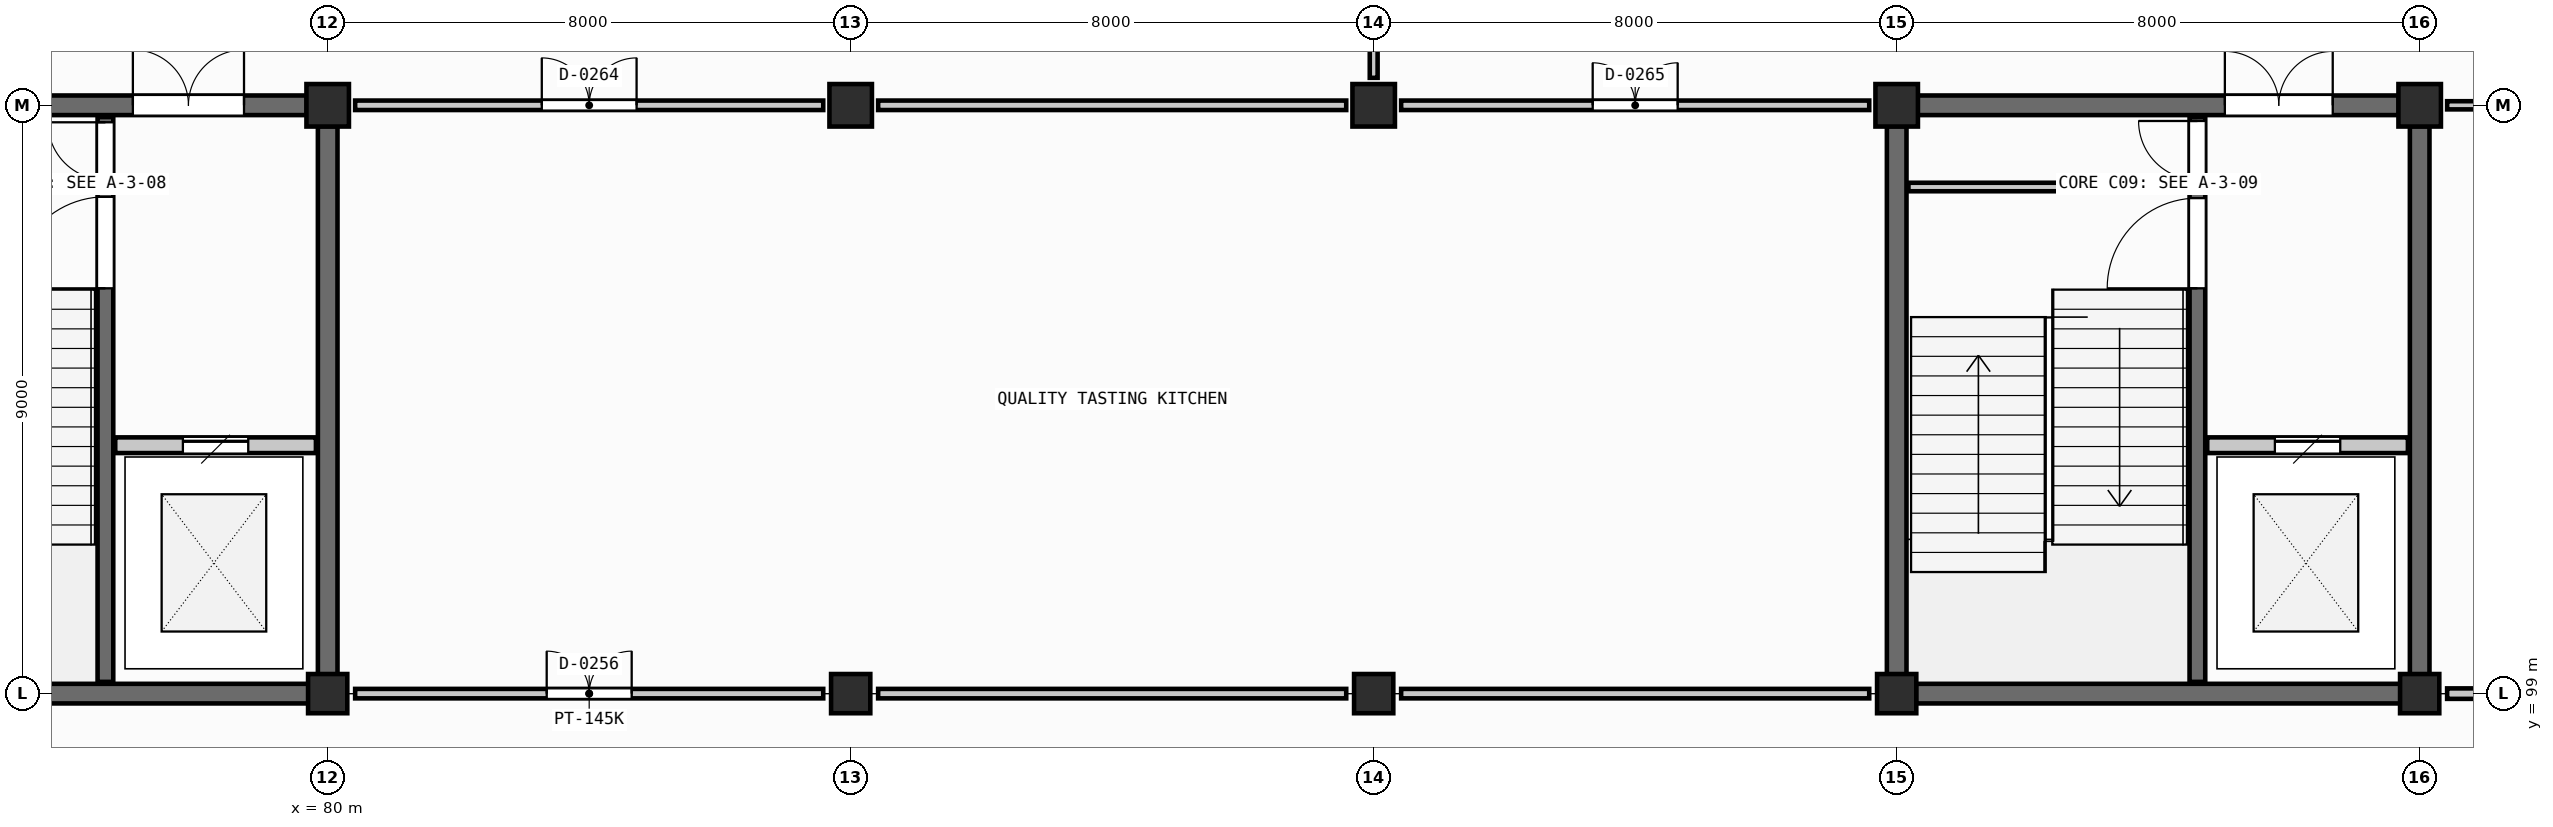
"""IFC4 building model, lengths in metres.
Left out: names, types, materials, properties, quantities, classifications, styles, units other than length and angle.
Written with IfcOpenShell. Run it as: python <this file> out.ifc"""

import sys

from ifc_helpers import new_model, si_unit, direction, frame, frame_2d, origin, origin_2d, place, context, subcontext, project, spatial, rectangle, extrude, element, fill, save


model = new_model("IFC4")
c1 = context("Model", 3, precision=1e-05, world=origin(), true_north=direction((0.0, 1.0)))
c2 = subcontext(c1, "Body", "Model", "MODEL_VIEW")
j1 = project(units=[si_unit("LENGTHUNIT", "METRE"), si_unit("PLANEANGLEUNIT", "RADIAN")], contexts=[c1])
p1 = place(None, origin())
s1 = spatial("IfcSite", under=j1, at=p1, CompositionType="ELEMENT")
p2 = place(p1, origin())
s2 = spatial("IfcBuilding", under=s1, at=p2, CompositionType="ELEMENT")
p3 = place(p2, frame((0.0, 0.0, 4.8)))
s3 = spatial("IfcBuildingStorey", under=s2, at=p3, CompositionType="ELEMENT", Elevation=4.8)
p4 = place(p3, frame((80.0, 99.0, 0.0), z_axis=(0.0, 0.0, 1.0), x_axis=(1.0, 0.0, 0.0)))
e1 = element("IfcColumn", 1, at=p4, inside=s3, PredefinedType="COLUMN", context=c2, shape_type="SweptSolid", body=[
    extrude(rectangle(XDim=0.6, YDim=0.6, at=origin_2d()), origin(), (0.0, 0.0, 1.0), 4.2),
])
p5 = place(p3, frame((80.0, 108.0, 0.0), z_axis=(0.0, 0.0, 1.0), x_axis=(1.0, 0.0, 0.0)))
e2 = element("IfcColumn", 2, at=p5, inside=s3, PredefinedType="COLUMN", context=c2, shape_type="SweptSolid", body=[
    extrude(rectangle(XDim=0.65, YDim=0.65, at=origin_2d()), origin(), (0.0, 0.0, 1.0), 4.2),
])
p6 = place(p3, frame((88.0, 99.0, 0.0), z_axis=(0.0, 0.0, 1.0), x_axis=(1.0, 0.0, 0.0)))
e3 = element("IfcColumn", 3, at=p6, inside=s3, PredefinedType="COLUMN", context=c2, shape_type="SweptSolid", body=[
    extrude(rectangle(XDim=0.6, YDim=0.6, at=origin_2d()), origin(), (0.0, 0.0, 1.0), 4.2),
])
p7 = place(p3, frame((88.0, 108.0, 0.0), z_axis=(0.0, 0.0, 1.0), x_axis=(1.0, 0.0, 0.0)))
e4 = element("IfcColumn", 4, at=p7, inside=s3, PredefinedType="COLUMN", context=c2, shape_type="SweptSolid", body=[
    extrude(rectangle(XDim=0.65, YDim=0.65, at=origin_2d()), origin(), (0.0, 0.0, 1.0), 4.2),
])
p8 = place(p3, frame((96.0, 99.0, 0.0), z_axis=(0.0, 0.0, 1.0), x_axis=(1.0, 0.0, 0.0)))
e5 = element("IfcColumn", 5, at=p8, inside=s3, PredefinedType="COLUMN", context=c2, shape_type="SweptSolid", body=[
    extrude(rectangle(XDim=0.6, YDim=0.6, at=origin_2d()), origin(), (0.0, 0.0, 1.0), 4.2),
])
p9 = place(p3, frame((96.0, 108.0, 0.0), z_axis=(0.0, 0.0, 1.0), x_axis=(1.0, 0.0, 0.0)))
e6 = element("IfcColumn", 6, at=p9, inside=s3, PredefinedType="COLUMN", context=c2, shape_type="SweptSolid", body=[
    extrude(rectangle(XDim=0.65, YDim=0.65, at=origin_2d()), origin(), (0.0, 0.0, 1.0), 4.2),
])
p10 = place(p3, frame((104.0, 99.0, 0.0), z_axis=(0.0, 0.0, 1.0), x_axis=(1.0, 0.0, 0.0)))
e7 = element("IfcColumn", 7, at=p10, inside=s3, PredefinedType="COLUMN", context=c2, shape_type="SweptSolid", body=[
    extrude(rectangle(XDim=0.6, YDim=0.6, at=origin_2d()), origin(), (0.0, 0.0, 1.0), 4.2),
])
p11 = place(p3, frame((104.0, 108.0, 0.0), z_axis=(0.0, 0.0, 1.0), x_axis=(1.0, 0.0, 0.0)))
e8 = element("IfcColumn", 8, at=p11, inside=s3, PredefinedType="COLUMN", context=c2, shape_type="SweptSolid", body=[
    extrude(rectangle(XDim=0.65, YDim=0.65, at=origin_2d()), origin(), (0.0, 0.0, 1.0), 4.2),
])
p12 = place(p3, frame((112.0, 99.0, 0.0), z_axis=(0.0, 0.0, 1.0), x_axis=(1.0, 0.0, 0.0)))
e9 = element("IfcColumn", 9, at=p12, inside=s3, PredefinedType="COLUMN", context=c2, shape_type="SweptSolid", body=[
    extrude(rectangle(XDim=0.6, YDim=0.6, at=origin_2d()), origin(), (0.0, 0.0, 1.0), 4.2),
])
p13 = place(p3, frame((112.0, 108.0, 0.0), z_axis=(0.0, 0.0, 1.0), x_axis=(1.0, 0.0, 0.0)))
e10 = element("IfcColumn", 10, at=p13, inside=s3, PredefinedType="COLUMN", context=c2, shape_type="SweptSolid", body=[
    extrude(rectangle(XDim=0.65, YDim=0.65, at=origin_2d()), origin(), (0.0, 0.0, 1.0), 4.2),
])
p14 = place(p3, frame((72.295, 99.0, 0.0), z_axis=(0.0, 0.0, 1.0), x_axis=(1.0, 0.0, 0.0)))
e11 = element("IfcWall", 11, at=p14, inside=s3, PredefinedType="SHEAR", context=c2, shape_type="SweptSolid", body=[
    extrude(rectangle(XDim=7.41, YDim=0.3, at=frame_2d((3.705, 0.0))), origin(), (0.0, 0.0, 1.0), 3.955),
])
p15 = place(p3, frame((72.32, 108.0, 0.0), z_axis=(0.0, 0.0, 1.0), x_axis=(1.0, 0.0, 0.0)))
e12 = element("IfcWall", 12, at=p15, inside=s3, PredefinedType="SHEAR", context=c2, shape_type="SweptSolid", body=[
    extrude(rectangle(XDim=7.36, YDim=0.3, at=frame_2d((3.68, 0.0))), origin(), (0.0, 0.0, 1.0), 3.955),
])
p16 = place(p15, frame((4.7, 0.0, 0.0)))
e13 = element("IfcOpeningElement", 13, at=p16, cuts=e12, PredefinedType="OPENING", context=c2, shape_type="SweptSolid", body=[
    extrude(rectangle(XDim=1.7, YDim=2.25, at=frame_2d((0.85, 1.125))), frame((0.0, 0.16, 0.0), z_axis=(0.0, -1.0, 0.0), x_axis=(1.0, 0.0, 0.0)), (0.0, 0.0, 1.0), 0.32),
])
p17 = place(p3, frame((80.0, 99.295, 0.0), z_axis=(0.0, 0.0, 1.0), x_axis=(0.0, 1.0, 0.0)))
e14 = element("IfcWall", 14, at=p17, inside=s3, PredefinedType="SHEAR", context=c2, shape_type="SweptSolid", body=[
    extrude(rectangle(XDim=8.385, YDim=0.3, at=frame_2d((4.192, 0.0))), origin(), (0.0, 0.0, 1.0), 3.955),
])
p18 = place(p3, frame((76.6, 99.18, 0.0), z_axis=(0.0, 0.0, 1.0), x_axis=(0.0, 1.0, 0.0)))
e15 = element("IfcWall", 15, at=p18, inside=s3, PredefinedType="SHEAR", context=c2, shape_type="SweptSolid", body=[
    extrude(rectangle(XDim=8.64, YDim=0.24, at=frame_2d((4.32, 0.0))), origin(), (0.0, 0.0, 1.0), 3.955),
])
p19 = place(p18, frame((6.02, 0.0, 0.0)))
e16 = element("IfcOpeningElement", 16, at=p19, cuts=e15, PredefinedType="OPENING", context=c2, shape_type="SweptSolid", body=[
    extrude(rectangle(XDim=1.4, YDim=2.2, at=frame_2d((0.7, 1.1))), frame((0.0, 0.13, 0.0), z_axis=(0.0, -1.0, 0.0), x_axis=(1.0, 0.0, 0.0)), (0.0, 0.0, 1.0), 0.26),
])
p20 = place(p18, frame((7.68, 0.0, 0.0)))
e17 = element("IfcOpeningElement", 17, at=p20, cuts=e15, PredefinedType="OPENING", context=c2, shape_type="SweptSolid", body=[
    extrude(rectangle(XDim=0.88, YDim=2.02, at=frame_2d((0.44, 1.01))), frame((0.0, 0.13, 0.0), z_axis=(0.0, -1.0, 0.0), x_axis=(1.0, 0.0, 0.0)), (0.0, 0.0, 1.0), 0.26),
])
p21 = place(p3, frame((72.18, 106.75, 0.0), z_axis=(0.0, 0.0, 1.0), x_axis=(1.0, 0.0, 0.0)))
e18 = element("IfcWall", 18, at=p21, inside=s3, PredefinedType="PARTITIONING", context=c2, shape_type="SweptSolid", body=[
    extrude(rectangle(XDim=4.28, YDim=0.13, at=frame_2d((2.14, 0.0))), origin(), (0.0, 0.0, 1.0), 3.305),
])
p22 = place(p3, frame((76.75, 102.8, 0.0), z_axis=(0.0, 0.0, 1.0), x_axis=(1.0, 0.0, 0.0)))
e19 = element("IfcWall", 19, at=p22, inside=s3, PredefinedType="SHEAR", context=c2, shape_type="SweptSolid", body=[
    extrude(rectangle(XDim=3.07, YDim=0.24, at=frame_2d((1.535, 0.0))), origin(), (0.0, 0.0, 1.0), 3.305),
])
p23 = place(p22, frame((1.035, 0.0, 0.0)))
e20 = element("IfcOpeningElement", 20, at=p23, cuts=e19, PredefinedType="OPENING", context=c2, shape_type="SweptSolid", body=[
    extrude(rectangle(XDim=1.0, YDim=2.15, at=frame_2d((0.5, 1.075))), frame((0.0, 0.13, 0.0), z_axis=(0.0, -1.0, 0.0), x_axis=(1.0, 0.0, 0.0)), (0.0, 0.0, 1.0), 0.26),
])
p24 = place(p3, frame((104.295, 99.0, 0.0), z_axis=(0.0, 0.0, 1.0), x_axis=(1.0, 0.0, 0.0)))
e21 = element("IfcWall", 21, at=p24, inside=s3, PredefinedType="SHEAR", context=c2, shape_type="SweptSolid", body=[
    extrude(rectangle(XDim=7.41, YDim=0.3, at=frame_2d((3.705, 0.0))), origin(), (0.0, 0.0, 1.0), 3.955),
])
p25 = place(p3, frame((104.32, 108.0, 0.0), z_axis=(0.0, 0.0, 1.0), x_axis=(1.0, 0.0, 0.0)))
e22 = element("IfcWall", 22, at=p25, inside=s3, PredefinedType="SHEAR", context=c2, shape_type="SweptSolid", body=[
    extrude(rectangle(XDim=7.36, YDim=0.3, at=frame_2d((3.68, 0.0))), origin(), (0.0, 0.0, 1.0), 3.955),
])
p26 = place(p25, frame((4.7, 0.0, 0.0)))
e23 = element("IfcOpeningElement", 23, at=p26, cuts=e22, PredefinedType="OPENING", context=c2, shape_type="SweptSolid", body=[
    extrude(rectangle(XDim=1.65, YDim=2.22, at=frame_2d((0.825, 1.11))), frame((0.0, 0.16, 0.0), z_axis=(0.0, -1.0, 0.0), x_axis=(1.0, 0.0, 0.0)), (0.0, 0.0, 1.0), 0.32),
])
for number, where, z_axis, x_axis in (
    (24, (104.0, 99.295, 0.0), (0.0, 0.0, 1.0), (0.0, 1.0, 0.0)),
    (25, (112.0, 99.295, 0.0), (0.0, 0.0, 1.0), (0.0, 1.0, 0.0)),
):
    element("IfcWall", number, at=place(p3, frame(where, z_axis=z_axis, x_axis=x_axis)), inside=s3, PredefinedType="SHEAR", context=c2, shape_type="SweptSolid", body=[
        extrude(rectangle(XDim=8.385, YDim=0.3, at=frame_2d((4.192, 0.0))), origin(), (0.0, 0.0, 1.0), 3.955),
    ])
p27 = place(p3, frame((108.6, 99.18, 0.0), z_axis=(0.0, 0.0, 1.0), x_axis=(0.0, 1.0, 0.0)))
e26 = element("IfcWall", 26, at=p27, inside=s3, PredefinedType="SHEAR", context=c2, shape_type="SweptSolid", body=[
    extrude(rectangle(XDim=8.64, YDim=0.24, at=frame_2d((4.32, 0.0))), origin(), (0.0, 0.0, 1.0), 3.955),
])
p28 = place(p27, frame((6.02, 0.0, 0.0)))
e27 = element("IfcOpeningElement", 27, at=p28, cuts=e26, PredefinedType="OPENING", context=c2, shape_type="SweptSolid", body=[
    extrude(rectangle(XDim=1.38, YDim=2.22, at=frame_2d((0.69, 1.11))), frame((0.0, 0.13, 0.0), z_axis=(0.0, -1.0, 0.0), x_axis=(1.0, 0.0, 0.0)), (0.0, 0.0, 1.0), 0.26),
])
p29 = place(p27, frame((7.68, 0.0, 0.0)))
e28 = element("IfcOpeningElement", 28, at=p29, cuts=e26, PredefinedType="OPENING", context=c2, shape_type="SweptSolid", body=[
    extrude(rectangle(XDim=0.9, YDim=2.05, at=frame_2d((0.45, 1.025))), frame((0.0, 0.13, 0.0), z_axis=(0.0, -1.0, 0.0), x_axis=(1.0, 0.0, 0.0)), (0.0, 0.0, 1.0), 0.26),
])
p30 = place(p3, frame((104.18, 106.75, 0.0), z_axis=(0.0, 0.0, 1.0), x_axis=(1.0, 0.0, 0.0)))
e29 = element("IfcWall", 29, at=p30, inside=s3, PredefinedType="PARTITIONING", context=c2, shape_type="SweptSolid", body=[
    extrude(rectangle(XDim=4.28, YDim=0.13, at=frame_2d((2.14, 0.0))), origin(), (0.0, 0.0, 1.0), 3.305),
])
p31 = place(p3, frame((108.75, 102.8, 0.0), z_axis=(0.0, 0.0, 1.0), x_axis=(1.0, 0.0, 0.0)))
e30 = element("IfcWall", 30, at=p31, inside=s3, PredefinedType="SHEAR", context=c2, shape_type="SweptSolid", body=[
    extrude(rectangle(XDim=3.07, YDim=0.24, at=frame_2d((1.535, 0.0))), origin(), (0.0, 0.0, 1.0), 3.305),
])
p32 = place(p31, frame((1.035, 0.0, 0.0)))
e31 = element("IfcOpeningElement", 31, at=p32, cuts=e30, PredefinedType="OPENING", context=c2, shape_type="SweptSolid", body=[
    extrude(rectangle(XDim=1.0, YDim=2.15, at=frame_2d((0.5, 1.075))), frame((0.0, 0.13, 0.0), z_axis=(0.0, -1.0, 0.0), x_axis=(1.0, 0.0, 0.0)), (0.0, 0.0, 1.0), 0.26),
])
p33 = place(p3, frame((80.42, 99.0, 0.0), z_axis=(0.0, 0.0, 1.0), x_axis=(1.0, 0.0, 0.0)))
e32 = element("IfcWall", 32, at=p33, inside=s3, PredefinedType="PARTITIONING", context=c2, shape_type="SweptSolid", body=[
    extrude(rectangle(XDim=7.16, YDim=0.145, at=frame_2d((3.58, 0.0))), origin(), (0.0, 0.0, 1.0), 3.05),
])
p34 = place(p33, frame((2.93, 0.0, 0.0)))
e33 = element("IfcOpeningElement", 33, at=p34, cuts=e32, PredefinedType="OPENING", context=c2, shape_type="SweptSolid", body=[
    extrude(rectangle(XDim=1.3, YDim=2.15, at=frame_2d((0.65, 1.075))), frame((0.0, 0.083, 0.0), z_axis=(0.0, -1.0, 0.0), x_axis=(1.0, 0.0, 0.0)), (0.0, 0.0, 1.0), 0.165),
])
for number, where, z_axis, x_axis in (
    (34, (88.42, 99.0, 0.0), (0.0, 0.0, 1.0), (1.0, 0.0, 0.0)),
    (35, (96.42, 99.0, 0.0), (0.0, 0.0, 1.0), (1.0, 0.0, 0.0)),
):
    element("IfcWall", number, at=place(p3, frame(where, z_axis=z_axis, x_axis=x_axis)), inside=s3, PredefinedType="PARTITIONING", context=c2, shape_type="SweptSolid", body=[
        extrude(rectangle(XDim=7.16, YDim=0.145, at=frame_2d((3.58, 0.0))), origin(), (0.0, 0.0, 1.0), 3.05),
    ])
p35 = place(p3, frame((112.42, 99.0, 0.0), z_axis=(0.0, 0.0, 1.0), x_axis=(1.0, 0.0, 0.0)))
e36 = element("IfcWall", 36, at=p35, inside=s3, PredefinedType="PARTITIONING", context=c2, shape_type="SweptSolid", body=[
    extrude(rectangle(XDim=7.16, YDim=0.16, at=frame_2d((3.58, 0.0))), origin(), (0.0, 0.0, 1.0), 3.05),
])
p36 = place(p35, frame((3.06, 0.0, 0.0)))
e37 = element("IfcOpeningElement", 37, at=p36, cuts=e36, PredefinedType="OPENING", context=c2, shape_type="SweptSolid", body=[
    extrude(rectangle(XDim=1.04, YDim=2.13, at=frame_2d((0.52, 1.065))), frame((0.0, 0.09, 0.0), z_axis=(0.0, -1.0, 0.0), x_axis=(1.0, 0.0, 0.0)), (0.0, 0.0, 1.0), 0.18),
])
p37 = place(p3, frame((80.42, 108.0, 0.0), z_axis=(0.0, 0.0, 1.0), x_axis=(1.0, 0.0, 0.0)))
e38 = element("IfcWall", 38, at=p37, inside=s3, PredefinedType="PARTITIONING", context=c2, shape_type="SweptSolid", body=[
    extrude(rectangle(XDim=7.16, YDim=0.145, at=frame_2d((3.58, 0.0))), origin(), (0.0, 0.0, 1.0), 3.05),
])
p38 = place(p37, frame((2.855, 0.0, 0.0)))
e39 = element("IfcOpeningElement", 39, at=p38, cuts=e38, PredefinedType="OPENING", context=c2, shape_type="SweptSolid", body=[
    extrude(rectangle(XDim=1.45, YDim=2.2, at=frame_2d((0.725, 1.1))), frame((0.0, 0.083, 0.0), z_axis=(0.0, -1.0, 0.0), x_axis=(1.0, 0.0, 0.0)), (0.0, 0.0, 1.0), 0.165),
])
p39 = place(p3, frame((88.42, 108.0, 0.0), z_axis=(0.0, 0.0, 1.0), x_axis=(1.0, 0.0, 0.0)))
e40 = element("IfcWall", 40, at=p39, inside=s3, PredefinedType="PARTITIONING", context=c2, shape_type="SweptSolid", body=[
    extrude(rectangle(XDim=7.16, YDim=0.145, at=frame_2d((3.58, 0.0))), origin(), (0.0, 0.0, 1.0), 3.05),
])
p40 = place(p3, frame((96.42, 108.0, 0.0), z_axis=(0.0, 0.0, 1.0), x_axis=(1.0, 0.0, 0.0)))
e41 = element("IfcWall", 41, at=p40, inside=s3, PredefinedType="PARTITIONING", context=c2, shape_type="SweptSolid", body=[
    extrude(rectangle(XDim=7.16, YDim=0.145, at=frame_2d((3.58, 0.0))), origin(), (0.0, 0.0, 1.0), 3.05),
])
p41 = place(p40, frame((2.93, 0.0, 0.0)))
e42 = element("IfcOpeningElement", 42, at=p41, cuts=e41, PredefinedType="OPENING", context=c2, shape_type="SweptSolid", body=[
    extrude(rectangle(XDim=1.3, YDim=2.15, at=frame_2d((0.65, 1.075))), frame((0.0, 0.083, 0.0), z_axis=(0.0, -1.0, 0.0), x_axis=(1.0, 0.0, 0.0)), (0.0, 0.0, 1.0), 0.165),
])
p42 = place(p3, frame((112.42, 108.0, 0.0), z_axis=(0.0, 0.0, 1.0), x_axis=(1.0, 0.0, 0.0)))
e43 = element("IfcWall", 43, at=p42, inside=s3, PredefinedType="PARTITIONING", context=c2, shape_type="SweptSolid", body=[
    extrude(rectangle(XDim=7.16, YDim=0.125, at=frame_2d((3.58, 0.0))), origin(), (0.0, 0.0, 1.0), 3.05),
])
p43 = place(p42, frame((3.09, 0.0, 0.0)))
e44 = element("IfcOpeningElement", 44, at=p43, cuts=e43, PredefinedType="OPENING", context=c2, shape_type="SweptSolid", body=[
    extrude(rectangle(XDim=0.98, YDim=2.12, at=frame_2d((0.49, 1.06))), frame((0.0, 0.073, 0.0), z_axis=(0.0, -1.0, 0.0), x_axis=(1.0, 0.0, 0.0)), (0.0, 0.0, 1.0), 0.145),
])
p44 = place(p3, frame((96.0, 108.42, 0.0), z_axis=(0.0, 0.0, 1.0), x_axis=(0.0, 1.0, 0.0)))
e45 = element("IfcWall", 45, at=p44, inside=s3, PredefinedType="PARTITIONING", context=c2, shape_type="SweptSolid", body=[
    extrude(rectangle(XDim=8.16, YDim=0.12, at=frame_2d((4.08, 0.0))), origin(), (0.0, 0.0, 1.0), 3.05),
])
p45 = place(p44, frame((3.54, 0.0, 0.0)))
e46 = element("IfcOpeningElement", 46, at=p45, cuts=e45, PredefinedType="OPENING", context=c2, shape_type="SweptSolid", body=[
    extrude(rectangle(XDim=1.08, YDim=2.16, at=frame_2d((0.54, 1.08))), frame((0.0, 0.07, 0.0), z_axis=(0.0, -1.0, 0.0), x_axis=(1.0, 0.0, 0.0)), (0.0, 0.0, 1.0), 0.14),
])
p46 = place(p19, origin())
e47 = element("IfcDoor", 47, at=p46, inside=s3, OperationType="SINGLE_SWING_LEFT", PredefinedType="DOOR", context=c2, shape_type="SweptSolid", body=[
    extrude(rectangle(XDim=1.4, YDim=2.2, at=frame_2d((0.7, 1.1))), frame((0.0, 0.025, 0.0), z_axis=(0.0, -1.0, 0.0), x_axis=(1.0, 0.0, 0.0)), (0.0, 0.0, 1.0), 0.05),
])
fill(e16, e47)
p47 = place(p20, origin())
e48 = element("IfcDoor", 48, at=p47, inside=s3, OperationType="SINGLE_SWING_RIGHT", PredefinedType="DOOR", context=c2, shape_type="SweptSolid", body=[
    extrude(rectangle(XDim=0.88, YDim=2.02, at=frame_2d((0.44, 1.01))), frame((0.0, 0.025, 0.0), z_axis=(0.0, -1.0, 0.0), x_axis=(1.0, 0.0, 0.0)), (0.0, 0.0, 1.0), 0.05),
])
fill(e17, e48)
p48 = place(p16, origin())
e49 = element("IfcDoor", 49, at=p48, inside=s3, OperationType="DOUBLE_DOOR_SINGLE_SWING", PredefinedType="DOOR", context=c2, shape_type="SweptSolid", body=[
    extrude(rectangle(XDim=1.7, YDim=2.25, at=frame_2d((0.85, 1.125))), frame((0.0, 0.025, 0.0), z_axis=(0.0, -1.0, 0.0), x_axis=(1.0, 0.0, 0.0)), (0.0, 0.0, 1.0), 0.05),
])
fill(e13, e49)
p49 = place(p23, origin())
e50 = element("IfcDoor", 50, at=p49, inside=s3, OperationType="SLIDING_TO_LEFT", PredefinedType="DOOR", context=c2, shape_type="SweptSolid", body=[
    extrude(rectangle(XDim=1.0, YDim=2.15, at=frame_2d((0.5, 1.075))), frame((0.0, 0.025, 0.0), z_axis=(0.0, -1.0, 0.0), x_axis=(1.0, 0.0, 0.0)), (0.0, 0.0, 1.0), 0.05),
])
fill(e20, e50)
p50 = place(p28, origin())
e51 = element("IfcDoor", 51, at=p50, inside=s3, OperationType="SINGLE_SWING_LEFT", PredefinedType="DOOR", context=c2, shape_type="SweptSolid", body=[
    extrude(rectangle(XDim=1.38, YDim=2.22, at=frame_2d((0.69, 1.11))), frame((0.0, 0.025, 0.0), z_axis=(0.0, -1.0, 0.0), x_axis=(1.0, 0.0, 0.0)), (0.0, 0.0, 1.0), 0.05),
])
fill(e27, e51)
p51 = place(p29, origin())
e52 = element("IfcDoor", 52, at=p51, inside=s3, OperationType="SINGLE_SWING_RIGHT", PredefinedType="DOOR", context=c2, shape_type="SweptSolid", body=[
    extrude(rectangle(XDim=0.9, YDim=2.05, at=frame_2d((0.45, 1.025))), frame((0.0, 0.025, 0.0), z_axis=(0.0, -1.0, 0.0), x_axis=(1.0, 0.0, 0.0)), (0.0, 0.0, 1.0), 0.05),
])
fill(e28, e52)
p52 = place(p26, origin())
e53 = element("IfcDoor", 53, at=p52, inside=s3, OperationType="DOUBLE_DOOR_SINGLE_SWING", PredefinedType="DOOR", context=c2, shape_type="SweptSolid", body=[
    extrude(rectangle(XDim=1.65, YDim=2.22, at=frame_2d((0.825, 1.11))), frame((0.0, 0.025, 0.0), z_axis=(0.0, -1.0, 0.0), x_axis=(1.0, 0.0, 0.0)), (0.0, 0.0, 1.0), 0.05),
])
fill(e23, e53)
p53 = place(p32, origin())
e54 = element("IfcDoor", 54, at=p53, inside=s3, OperationType="SLIDING_TO_LEFT", PredefinedType="DOOR", context=c2, shape_type="SweptSolid", body=[
    extrude(rectangle(XDim=1.0, YDim=2.15, at=frame_2d((0.5, 1.075))), frame((0.0, 0.025, 0.0), z_axis=(0.0, -1.0, 0.0), x_axis=(1.0, 0.0, 0.0)), (0.0, 0.0, 1.0), 0.05),
])
fill(e31, e54)
p54 = place(p34, origin())
e55 = element("IfcDoor", 55, at=p54, inside=s3, OperationType="DOUBLE_DOOR_DOUBLE_SWING", PredefinedType="DOOR", context=c2, shape_type="SweptSolid", body=[
    extrude(rectangle(XDim=1.3, YDim=2.15, at=frame_2d((0.65, 1.075))), frame((0.0, 0.025, 0.0), z_axis=(0.0, -1.0, 0.0), x_axis=(1.0, 0.0, 0.0)), (0.0, 0.0, 1.0), 0.05),
])
fill(e33, e55)
p55 = place(p38, origin())
e56 = element("IfcDoor", 56, at=p55, inside=s3, OperationType="DOUBLE_DOOR_DOUBLE_SWING", PredefinedType="DOOR", context=c2, shape_type="SweptSolid", body=[
    extrude(rectangle(XDim=1.45, YDim=2.2, at=frame_2d((0.725, 1.1))), frame((0.0, 0.025, 0.0), z_axis=(0.0, -1.0, 0.0), x_axis=(1.0, 0.0, 0.0)), (0.0, 0.0, 1.0), 0.05),
])
fill(e39, e56)
p56 = place(p41, origin())
e57 = element("IfcDoor", 57, at=p56, inside=s3, OperationType="DOUBLE_DOOR_DOUBLE_SWING", PredefinedType="DOOR", context=c2, shape_type="SweptSolid", body=[
    extrude(rectangle(XDim=1.3, YDim=2.15, at=frame_2d((0.65, 1.075))), frame((0.0, 0.025, 0.0), z_axis=(0.0, -1.0, 0.0), x_axis=(1.0, 0.0, 0.0)), (0.0, 0.0, 1.0), 0.05),
])
fill(e42, e57)
save(model, sys.argv[1])
